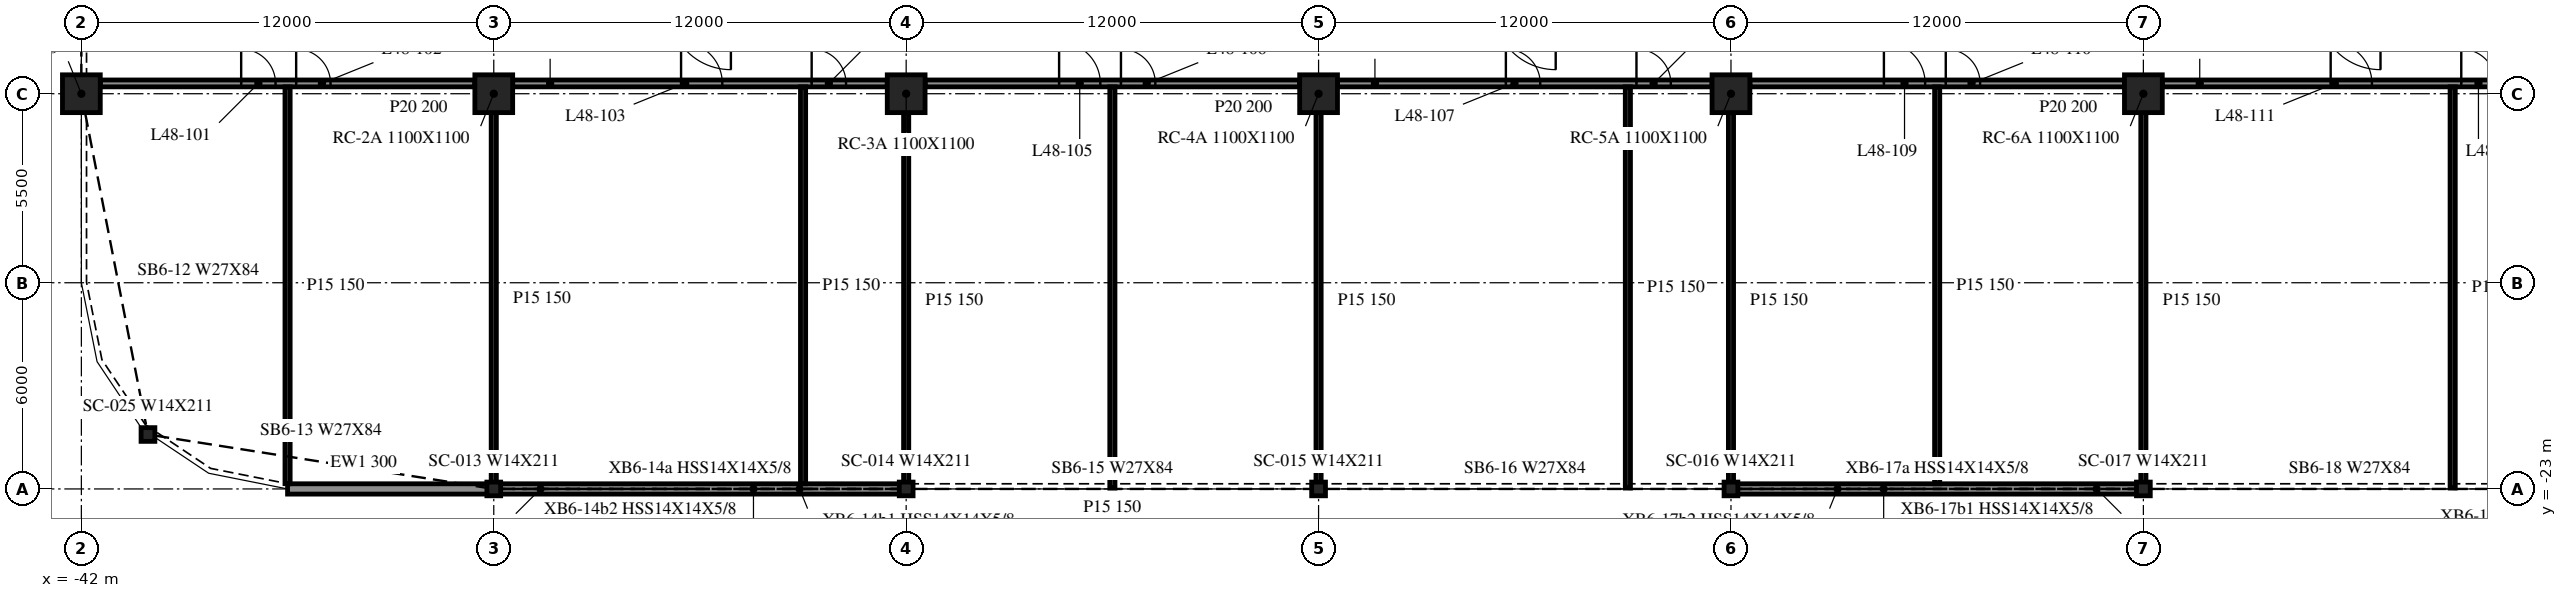
"""IFC4 building model, lengths in metres.
Left out: names, types, materials, properties, quantities, classifications, styles, units other than length and angle.
Written with IfcOpenShell. Run it as: python <this file> out.ifc"""

import sys

from ifc_helpers import new_model, si_unit, direction, frame, frame_2d, origin, origin_2d, place, context, subcontext, project, spatial, rectangle, i_section, extrude, element, fill, save


model = new_model("IFC4")
c1 = context("Model", 3, precision=1e-05, world=origin(), true_north=direction((0.0, 1.0)))
c2 = subcontext(c1, "Body", "Model", "MODEL_VIEW")
j1 = project(units=[si_unit("LENGTHUNIT", "METRE"), si_unit("PLANEANGLEUNIT", "RADIAN")], contexts=[c1])
p1 = place(None, origin())
s1 = spatial("IfcSite", under=j1, at=p1, CompositionType="ELEMENT")
p2 = place(p1, origin())
s2 = spatial("IfcBuilding", under=s1, at=p2, CompositionType="ELEMENT")
p3 = place(p2, frame((0.0, 0.0, 201.5)))
s3 = spatial("IfcBuildingStorey", under=s2, at=p3, CompositionType="ELEMENT", Elevation=201.5)
for number, where, z_axis, x_axis in (
    (1, (-42.0, -11.5, -0.34), (0.0, 0.0, 1.0), (1.0, 0.0, 0.0)),
    (2, (-30.0, -11.5, -0.34), (0.0, 0.0, 1.0), (1.0, 0.0, 0.0)),
    (3, (-18.0, -11.5, -0.34), (0.0, 0.0, 1.0), (1.0, 0.0, 0.0)),
    (4, (-6.0, -11.5, -0.34), (0.0, 0.0, 1.0), (1.0, 0.0, 0.0)),
    (5, (6.0, -11.5, -0.34), (0.0, 0.0, 1.0), (1.0, 0.0, 0.0)),
    (6, (18.0, -11.5, -0.34), (0.0, 0.0, 1.0), (1.0, 0.0, 0.0)),
):
    element("IfcColumn", number, at=place(p3, frame(where, z_axis=z_axis, x_axis=x_axis)), inside=s3, PredefinedType="COLUMN", context=c2, shape_type="SweptSolid", body=[
        extrude(rectangle(XDim=1.1, YDim=1.1, at=origin_2d()), origin(), (0.0, 0.0, 1.0), 3.8),
    ])
for number, where, z_axis, x_axis in (
    (7, (-40.062, -21.416, -0.34), (0.0, 0.0, 1.0), (1.0, 0.0, 0.0)),
    (8, (-30.0, -23.0, -0.34), (0.0, 0.0, 1.0), (1.0, 0.0, 0.0)),
    (9, (-18.0, -23.0, -0.34), (0.0, 0.0, 1.0), (1.0, 0.0, 0.0)),
    (10, (-6.0, -23.0, -0.34), (0.0, 0.0, 1.0), (1.0, 0.0, 0.0)),
    (11, (6.0, -23.0, -0.34), (0.0, 0.0, 1.0), (1.0, 0.0, 0.0)),
    (12, (18.0, -23.0, -0.34), (0.0, 0.0, 1.0), (1.0, 0.0, 0.0)),
):
    element("IfcColumn", number, at=place(p3, frame(where, z_axis=z_axis, x_axis=x_axis)), inside=s3, PredefinedType="COLUMN", context=c2, shape_type="SweptSolid", body=[
        extrude(i_section(OverallWidth=0.401, OverallDepth=0.399, WebThickness=0.025, FlangeThickness=0.04, at=origin_2d()), origin(), (0.0, 0.0, 1.0), 3.8),
    ])
p4 = place(p3, frame((-36.0, -23.0, 0.0), z_axis=(0.0, 0.0, 1.0), x_axis=(1.0, 0.0, 0.0)))
e13 = element("IfcWall", 13, at=p4, inside=s3, PredefinedType="NOTDEFINED", context=c2, shape_type="SweptSolid", body=[
    extrude(rectangle(XDim=5.988, YDim=0.3, at=frame_2d((2.994, 0.0))), origin(), (0.0, 0.0, 1.0), 2.782),
])
for number, where, z_axis, x_axis in (
    (14, (-29.988, -23.0, 0.0), (0.0, 0.0, 1.0), (1.0, 0.0, 0.0)),
    (15, (6.012, -23.0, 0.0), (0.0, 0.0, 1.0), (1.0, 0.0, 0.0)),
):
    element("IfcWall", number, at=place(p3, frame(where, z_axis=z_axis, x_axis=x_axis)), inside=s3, PredefinedType="NOTDEFINED", context=c2, shape_type="SweptSolid", body=[
        extrude(rectangle(XDim=11.975, YDim=0.3, at=frame_2d((5.988, 0.0))), origin(), (0.0, 0.0, 1.0), 2.782),
    ])
p5 = place(p3, frame((-41.45, -11.2, 0.0), z_axis=(0.0, 0.0, 1.0), x_axis=(1.0, 0.0, 0.0)))
e16 = element("IfcWall", 16, at=p5, inside=s3, PredefinedType="PARTITIONING", context=c2, shape_type="SweptSolid", body=[
    extrude(rectangle(XDim=10.9, YDim=0.2, at=frame_2d((5.45, 0.0))), origin(), (0.0, 0.0, 1.0), 3.46),
])
p6 = place(p5, frame((4.1, 0.0, 0.0)))
e17 = element("IfcOpeningElement", 17, at=p6, cuts=e16, PredefinedType="OPENING", context=c2, shape_type="SweptSolid", body=[
    extrude(rectangle(XDim=1.0, YDim=2.1, at=frame_2d((0.5, 1.05))), frame((0.0, 0.11, 0.0), z_axis=(0.0, -1.0, 0.0), x_axis=(1.0, 0.0, 0.0)), (0.0, 0.0, 1.0), 0.22),
])
p7 = place(p5, frame((5.7, 0.0, 0.0)))
e18 = element("IfcOpeningElement", 18, at=p7, cuts=e16, PredefinedType="OPENING", context=c2, shape_type="SweptSolid", body=[
    extrude(rectangle(XDim=1.0, YDim=2.1, at=frame_2d((0.5, 1.05))), frame((0.0, 0.11, 0.0), z_axis=(0.0, -1.0, 0.0), x_axis=(1.0, 0.0, 0.0)), (0.0, 0.0, 1.0), 0.22),
])
p8 = place(p3, frame((-29.45, -11.2, 0.0), z_axis=(0.0, 0.0, 1.0), x_axis=(1.0, 0.0, 0.0)))
e19 = element("IfcWall", 19, at=p8, inside=s3, PredefinedType="PARTITIONING", context=c2, shape_type="SweptSolid", body=[
    extrude(rectangle(XDim=10.9, YDim=0.2, at=frame_2d((5.45, 0.0))), origin(), (0.0, 0.0, 1.0), 3.46),
])
p9 = place(p8, frame((4.9, 0.0, 0.0)))
e20 = element("IfcOpeningElement", 20, at=p9, cuts=e19, PredefinedType="OPENING", context=c2, shape_type="SweptSolid", body=[
    extrude(rectangle(XDim=1.2, YDim=2.1, at=frame_2d((0.6, 1.05))), frame((0.0, 0.11, 0.0), z_axis=(0.0, -1.0, 0.0), x_axis=(1.0, 0.0, 0.0)), (0.0, 0.0, 1.0), 0.22),
])
p10 = place(p8, frame((8.7, 0.0, 0.0)))
e21 = element("IfcOpeningElement", 21, at=p10, cuts=e19, PredefinedType="OPENING", context=c2, shape_type="SweptSolid", body=[
    extrude(rectangle(XDim=1.0, YDim=2.1, at=frame_2d((0.5, 1.05))), frame((0.0, 0.11, 0.0), z_axis=(0.0, -1.0, 0.0), x_axis=(1.0, 0.0, 0.0)), (0.0, 0.0, 1.0), 0.22),
])
p11 = place(p3, frame((-17.45, -11.2, 0.0), z_axis=(0.0, 0.0, 1.0), x_axis=(1.0, 0.0, 0.0)))
e22 = element("IfcWall", 22, at=p11, inside=s3, PredefinedType="PARTITIONING", context=c2, shape_type="SweptSolid", body=[
    extrude(rectangle(XDim=10.9, YDim=0.2, at=frame_2d((5.45, 0.0))), origin(), (0.0, 0.0, 1.0), 3.46),
])
p12 = place(p11, frame((3.9, 0.0, 0.0)))
e23 = element("IfcOpeningElement", 23, at=p12, cuts=e22, PredefinedType="OPENING", context=c2, shape_type="SweptSolid", body=[
    extrude(rectangle(XDim=1.2, YDim=2.1, at=frame_2d((0.6, 1.05))), frame((0.0, 0.11, 0.0), z_axis=(0.0, -1.0, 0.0), x_axis=(1.0, 0.0, 0.0)), (0.0, 0.0, 1.0), 0.22),
])
p13 = place(p11, frame((5.7, 0.0, 0.0)))
e24 = element("IfcOpeningElement", 24, at=p13, cuts=e22, PredefinedType="OPENING", context=c2, shape_type="SweptSolid", body=[
    extrude(rectangle(XDim=1.0, YDim=2.1, at=frame_2d((0.5, 1.05))), frame((0.0, 0.11, 0.0), z_axis=(0.0, -1.0, 0.0), x_axis=(1.0, 0.0, 0.0)), (0.0, 0.0, 1.0), 0.22),
])
p14 = place(p3, frame((-5.45, -11.2, 0.0), z_axis=(0.0, 0.0, 1.0), x_axis=(1.0, 0.0, 0.0)))
e25 = element("IfcWall", 25, at=p14, inside=s3, PredefinedType="PARTITIONING", context=c2, shape_type="SweptSolid", body=[
    extrude(rectangle(XDim=10.9, YDim=0.2, at=frame_2d((5.45, 0.0))), origin(), (0.0, 0.0, 1.0), 3.46),
])
p15 = place(p14, frame((4.9, 0.0, 0.0)))
e26 = element("IfcOpeningElement", 26, at=p15, cuts=e25, PredefinedType="OPENING", context=c2, shape_type="SweptSolid", body=[
    extrude(rectangle(XDim=1.0, YDim=2.1, at=frame_2d((0.5, 1.05))), frame((0.0, 0.11, 0.0), z_axis=(0.0, -1.0, 0.0), x_axis=(1.0, 0.0, 0.0)), (0.0, 0.0, 1.0), 0.22),
])
p16 = place(p14, frame((8.7, 0.0, 0.0)))
e27 = element("IfcOpeningElement", 27, at=p16, cuts=e25, PredefinedType="OPENING", context=c2, shape_type="SweptSolid", body=[
    extrude(rectangle(XDim=1.0, YDim=2.1, at=frame_2d((0.5, 1.05))), frame((0.0, 0.11, 0.0), z_axis=(0.0, -1.0, 0.0), x_axis=(1.0, 0.0, 0.0)), (0.0, 0.0, 1.0), 0.22),
])
p17 = place(p3, frame((6.55, -11.2, 0.0), z_axis=(0.0, 0.0, 1.0), x_axis=(1.0, 0.0, 0.0)))
e28 = element("IfcWall", 28, at=p17, inside=s3, PredefinedType="PARTITIONING", context=c2, shape_type="SweptSolid", body=[
    extrude(rectangle(XDim=10.9, YDim=0.2, at=frame_2d((5.45, 0.0))), origin(), (0.0, 0.0, 1.0), 3.46),
])
p18 = place(p17, frame((3.9, 0.0, 0.0)))
e29 = element("IfcOpeningElement", 29, at=p18, cuts=e28, PredefinedType="OPENING", context=c2, shape_type="SweptSolid", body=[
    extrude(rectangle(XDim=1.2, YDim=2.1, at=frame_2d((0.6, 1.05))), frame((0.0, 0.11, 0.0), z_axis=(0.0, -1.0, 0.0), x_axis=(1.0, 0.0, 0.0)), (0.0, 0.0, 1.0), 0.22),
])
p19 = place(p17, frame((5.7, 0.0, 0.0)))
e30 = element("IfcOpeningElement", 30, at=p19, cuts=e28, PredefinedType="OPENING", context=c2, shape_type="SweptSolid", body=[
    extrude(rectangle(XDim=1.0, YDim=2.1, at=frame_2d((0.5, 1.05))), frame((0.0, 0.11, 0.0), z_axis=(0.0, -1.0, 0.0), x_axis=(1.0, 0.0, 0.0)), (0.0, 0.0, 1.0), 0.22),
])
p20 = place(p3, frame((18.55, -11.2, 0.0), z_axis=(0.0, 0.0, 1.0), x_axis=(1.0, 0.0, 0.0)))
e31 = element("IfcWall", 31, at=p20, inside=s3, PredefinedType="PARTITIONING", context=c2, shape_type="SweptSolid", body=[
    extrude(rectangle(XDim=10.9, YDim=0.2, at=frame_2d((5.45, 0.0))), origin(), (0.0, 0.0, 1.0), 3.46),
])
p21 = place(p20, frame((4.9, 0.0, 0.0)))
e32 = element("IfcOpeningElement", 32, at=p21, cuts=e31, PredefinedType="OPENING", context=c2, shape_type="SweptSolid", body=[
    extrude(rectangle(XDim=1.2, YDim=2.1, at=frame_2d((0.6, 1.05))), frame((0.0, 0.11, 0.0), z_axis=(0.0, -1.0, 0.0), x_axis=(1.0, 0.0, 0.0)), (0.0, 0.0, 1.0), 0.22),
])
p22 = place(p20, frame((8.7, 0.0, 0.0)))
e33 = element("IfcOpeningElement", 33, at=p22, cuts=e31, PredefinedType="OPENING", context=c2, shape_type="SweptSolid", body=[
    extrude(rectangle(XDim=1.0, YDim=2.1, at=frame_2d((0.5, 1.05))), frame((0.0, 0.11, 0.0), z_axis=(0.0, -1.0, 0.0), x_axis=(1.0, 0.0, 0.0)), (0.0, 0.0, 1.0), 0.22),
])
p23 = place(p3, frame((-36.0, -22.847, 0.0), z_axis=(0.0, 0.0, 1.0), x_axis=(0.0, 1.0, 0.0)))
e34 = element("IfcWall", 34, at=p23, inside=s3, PredefinedType="PARTITIONING", context=c2, shape_type="SweptSolid", body=[
    extrude(rectangle(XDim=11.547, YDim=0.15, at=frame_2d((5.773, 0.0))), origin(), (0.0, 0.0, 1.0), 3.46),
])
p24 = place(p3, frame((-30.0, -22.85, 0.0), z_axis=(0.0, 0.0, 1.0), x_axis=(0.0, 1.0, 0.0)))
e35 = element("IfcWall", 35, at=p24, inside=s3, PredefinedType="PARTITIONING", context=c2, shape_type="SweptSolid", body=[
    extrude(rectangle(XDim=10.8, YDim=0.15, at=frame_2d((5.4, 0.0))), origin(), (0.0, 0.0, 1.0), 3.46),
])
p25 = place(p3, frame((-21.0, -22.85, 0.0), z_axis=(0.0, 0.0, 1.0), x_axis=(0.0, 1.0, 0.0)))
e36 = element("IfcWall", 36, at=p25, inside=s3, PredefinedType="PARTITIONING", context=c2, shape_type="SweptSolid", body=[
    extrude(rectangle(XDim=11.55, YDim=0.15, at=frame_2d((5.775, 0.0))), origin(), (0.0, 0.0, 1.0), 3.46),
])
p26 = place(p3, frame((-18.0, -22.975, 0.0), z_axis=(0.0, 0.0, 1.0), x_axis=(0.0, 1.0, 0.0)))
e37 = element("IfcWall", 37, at=p26, inside=s3, PredefinedType="PARTITIONING", context=c2, shape_type="SweptSolid", body=[
    extrude(rectangle(XDim=10.925, YDim=0.15, at=frame_2d((5.462, 0.0))), origin(), (0.0, 0.0, 1.0), 3.46),
])
p27 = place(p3, frame((-12.0, -22.975, 0.0), z_axis=(0.0, 0.0, 1.0), x_axis=(0.0, 1.0, 0.0)))
e38 = element("IfcWall", 38, at=p27, inside=s3, PredefinedType="PARTITIONING", context=c2, shape_type="SweptSolid", body=[
    extrude(rectangle(XDim=11.675, YDim=0.15, at=frame_2d((5.837, 0.0))), origin(), (0.0, 0.0, 1.0), 3.46),
])
p28 = place(p3, frame((-6.0, -22.975, 0.0), z_axis=(0.0, 0.0, 1.0), x_axis=(0.0, 1.0, 0.0)))
e39 = element("IfcWall", 39, at=p28, inside=s3, PredefinedType="PARTITIONING", context=c2, shape_type="SweptSolid", body=[
    extrude(rectangle(XDim=10.925, YDim=0.15, at=frame_2d((5.462, 0.0))), origin(), (0.0, 0.0, 1.0), 3.46),
])
p29 = place(p3, frame((3.0, -22.975, 0.0), z_axis=(0.0, 0.0, 1.0), x_axis=(0.0, 1.0, 0.0)))
e40 = element("IfcWall", 40, at=p29, inside=s3, PredefinedType="PARTITIONING", context=c2, shape_type="SweptSolid", body=[
    extrude(rectangle(XDim=11.675, YDim=0.15, at=frame_2d((5.837, 0.0))), origin(), (0.0, 0.0, 1.0), 3.46),
])
p30 = place(p3, frame((6.0, -22.975, 0.0), z_axis=(0.0, 0.0, 1.0), x_axis=(0.0, 1.0, 0.0)))
e41 = element("IfcWall", 41, at=p30, inside=s3, PredefinedType="PARTITIONING", context=c2, shape_type="SweptSolid", body=[
    extrude(rectangle(XDim=10.925, YDim=0.15, at=frame_2d((5.462, 0.0))), origin(), (0.0, 0.0, 1.0), 3.46),
])
p31 = place(p3, frame((12.0, -22.85, 0.0), z_axis=(0.0, 0.0, 1.0), x_axis=(0.0, 1.0, 0.0)))
e42 = element("IfcWall", 42, at=p31, inside=s3, PredefinedType="PARTITIONING", context=c2, shape_type="SweptSolid", body=[
    extrude(rectangle(XDim=11.55, YDim=0.15, at=frame_2d((5.775, 0.0))), origin(), (0.0, 0.0, 1.0), 3.46),
])
p32 = place(p3, frame((18.0, -22.975, 0.0), z_axis=(0.0, 0.0, 1.0), x_axis=(0.0, 1.0, 0.0)))
e43 = element("IfcWall", 43, at=p32, inside=s3, PredefinedType="PARTITIONING", context=c2, shape_type="SweptSolid", body=[
    extrude(rectangle(XDim=10.925, YDim=0.15, at=frame_2d((5.462, 0.0))), origin(), (0.0, 0.0, 1.0), 3.46),
])
p33 = place(p3, frame((27.0, -22.975, 0.0), z_axis=(0.0, 0.0, 1.0), x_axis=(0.0, 1.0, 0.0)))
e44 = element("IfcWall", 44, at=p33, inside=s3, PredefinedType="PARTITIONING", context=c2, shape_type="SweptSolid", body=[
    extrude(rectangle(XDim=11.675, YDim=0.15, at=frame_2d((5.837, 0.0))), origin(), (0.0, 0.0, 1.0), 3.46),
])
p34 = place(p6, origin())
e45 = element("IfcDoor", 45, at=p34, inside=s3, OperationType="SINGLE_SWING_RIGHT", PredefinedType="DOOR", context=c2, shape_type="SweptSolid", body=[
    extrude(rectangle(XDim=1.0, YDim=2.1, at=frame_2d((0.5, 1.05))), frame((0.0, 0.025, 0.0), z_axis=(0.0, -1.0, 0.0), x_axis=(1.0, 0.0, 0.0)), (0.0, 0.0, 1.0), 0.05),
])
fill(e17, e45)
p35 = place(p7, origin())
e46 = element("IfcDoor", 46, at=p35, inside=s3, OperationType="SINGLE_SWING_LEFT", PredefinedType="DOOR", context=c2, shape_type="SweptSolid", body=[
    extrude(rectangle(XDim=1.0, YDim=2.1, at=frame_2d((0.5, 1.05))), frame((0.0, 0.025, 0.0), z_axis=(0.0, -1.0, 0.0), x_axis=(1.0, 0.0, 0.0)), (0.0, 0.0, 1.0), 0.05),
])
fill(e18, e46)
p36 = place(p9, origin())
e47 = element("IfcDoor", 47, at=p36, inside=s3, OperationType="SINGLE_SWING_LEFT", PredefinedType="DOOR", context=c2, shape_type="SweptSolid", body=[
    extrude(rectangle(XDim=1.2, YDim=2.1, at=frame_2d((0.6, 1.05))), frame((0.0, 0.025, 0.0), z_axis=(0.0, -1.0, 0.0), x_axis=(1.0, 0.0, 0.0)), (0.0, 0.0, 1.0), 0.05),
])
fill(e20, e47)
p37 = place(p10, origin())
e48 = element("IfcDoor", 48, at=p37, inside=s3, OperationType="SINGLE_SWING_LEFT", PredefinedType="DOOR", context=c2, shape_type="SweptSolid", body=[
    extrude(rectangle(XDim=1.0, YDim=2.1, at=frame_2d((0.5, 1.05))), frame((0.0, 0.025, 0.0), z_axis=(0.0, -1.0, 0.0), x_axis=(1.0, 0.0, 0.0)), (0.0, 0.0, 1.0), 0.05),
])
fill(e21, e48)
p38 = place(p12, origin())
e49 = element("IfcDoor", 49, at=p38, inside=s3, OperationType="SINGLE_SWING_RIGHT", PredefinedType="DOOR", context=c2, shape_type="SweptSolid", body=[
    extrude(rectangle(XDim=1.2, YDim=2.1, at=frame_2d((0.6, 1.05))), frame((0.0, 0.025, 0.0), z_axis=(0.0, -1.0, 0.0), x_axis=(1.0, 0.0, 0.0)), (0.0, 0.0, 1.0), 0.05),
])
fill(e23, e49)
p39 = place(p13, origin())
e50 = element("IfcDoor", 50, at=p39, inside=s3, OperationType="SINGLE_SWING_LEFT", PredefinedType="DOOR", context=c2, shape_type="SweptSolid", body=[
    extrude(rectangle(XDim=1.0, YDim=2.1, at=frame_2d((0.5, 1.05))), frame((0.0, 0.025, 0.0), z_axis=(0.0, -1.0, 0.0), x_axis=(1.0, 0.0, 0.0)), (0.0, 0.0, 1.0), 0.05),
])
fill(e24, e50)
p40 = place(p15, origin())
e51 = element("IfcDoor", 51, at=p40, inside=s3, OperationType="SINGLE_SWING_RIGHT", PredefinedType="DOOR", context=c2, shape_type="SweptSolid", body=[
    extrude(rectangle(XDim=1.0, YDim=2.1, at=frame_2d((0.5, 1.05))), frame((0.0, 0.025, 0.0), z_axis=(0.0, -1.0, 0.0), x_axis=(1.0, 0.0, 0.0)), (0.0, 0.0, 1.0), 0.05),
])
fill(e26, e51)
p41 = place(p16, origin())
e52 = element("IfcDoor", 52, at=p41, inside=s3, OperationType="SINGLE_SWING_LEFT", PredefinedType="DOOR", context=c2, shape_type="SweptSolid", body=[
    extrude(rectangle(XDim=1.0, YDim=2.1, at=frame_2d((0.5, 1.05))), frame((0.0, 0.025, 0.0), z_axis=(0.0, -1.0, 0.0), x_axis=(1.0, 0.0, 0.0)), (0.0, 0.0, 1.0), 0.05),
])
fill(e27, e52)
p42 = place(p18, origin())
e53 = element("IfcDoor", 53, at=p42, inside=s3, OperationType="SINGLE_SWING_RIGHT", PredefinedType="DOOR", context=c2, shape_type="SweptSolid", body=[
    extrude(rectangle(XDim=1.2, YDim=2.1, at=frame_2d((0.6, 1.05))), frame((0.0, 0.025, 0.0), z_axis=(0.0, -1.0, 0.0), x_axis=(1.0, 0.0, 0.0)), (0.0, 0.0, 1.0), 0.05),
])
fill(e29, e53)
p43 = place(p19, origin())
e54 = element("IfcDoor", 54, at=p43, inside=s3, OperationType="SINGLE_SWING_LEFT", PredefinedType="DOOR", context=c2, shape_type="SweptSolid", body=[
    extrude(rectangle(XDim=1.0, YDim=2.1, at=frame_2d((0.5, 1.05))), frame((0.0, 0.025, 0.0), z_axis=(0.0, -1.0, 0.0), x_axis=(1.0, 0.0, 0.0)), (0.0, 0.0, 1.0), 0.05),
])
fill(e30, e54)
p44 = place(p21, origin())
e55 = element("IfcDoor", 55, at=p44, inside=s3, OperationType="SINGLE_SWING_LEFT", PredefinedType="DOOR", context=c2, shape_type="SweptSolid", body=[
    extrude(rectangle(XDim=1.2, YDim=2.1, at=frame_2d((0.6, 1.05))), frame((0.0, 0.025, 0.0), z_axis=(0.0, -1.0, 0.0), x_axis=(1.0, 0.0, 0.0)), (0.0, 0.0, 1.0), 0.05),
])
fill(e32, e55)
p45 = place(p22, origin())
e56 = element("IfcDoor", 56, at=p45, inside=s3, OperationType="SINGLE_SWING_LEFT", PredefinedType="DOOR", context=c2, shape_type="SweptSolid", body=[
    extrude(rectangle(XDim=1.0, YDim=2.1, at=frame_2d((0.5, 1.05))), frame((0.0, 0.025, 0.0), z_axis=(0.0, -1.0, 0.0), x_axis=(1.0, 0.0, 0.0)), (0.0, 0.0, 1.0), 0.05),
])
fill(e33, e56)
save(model, sys.argv[1])
